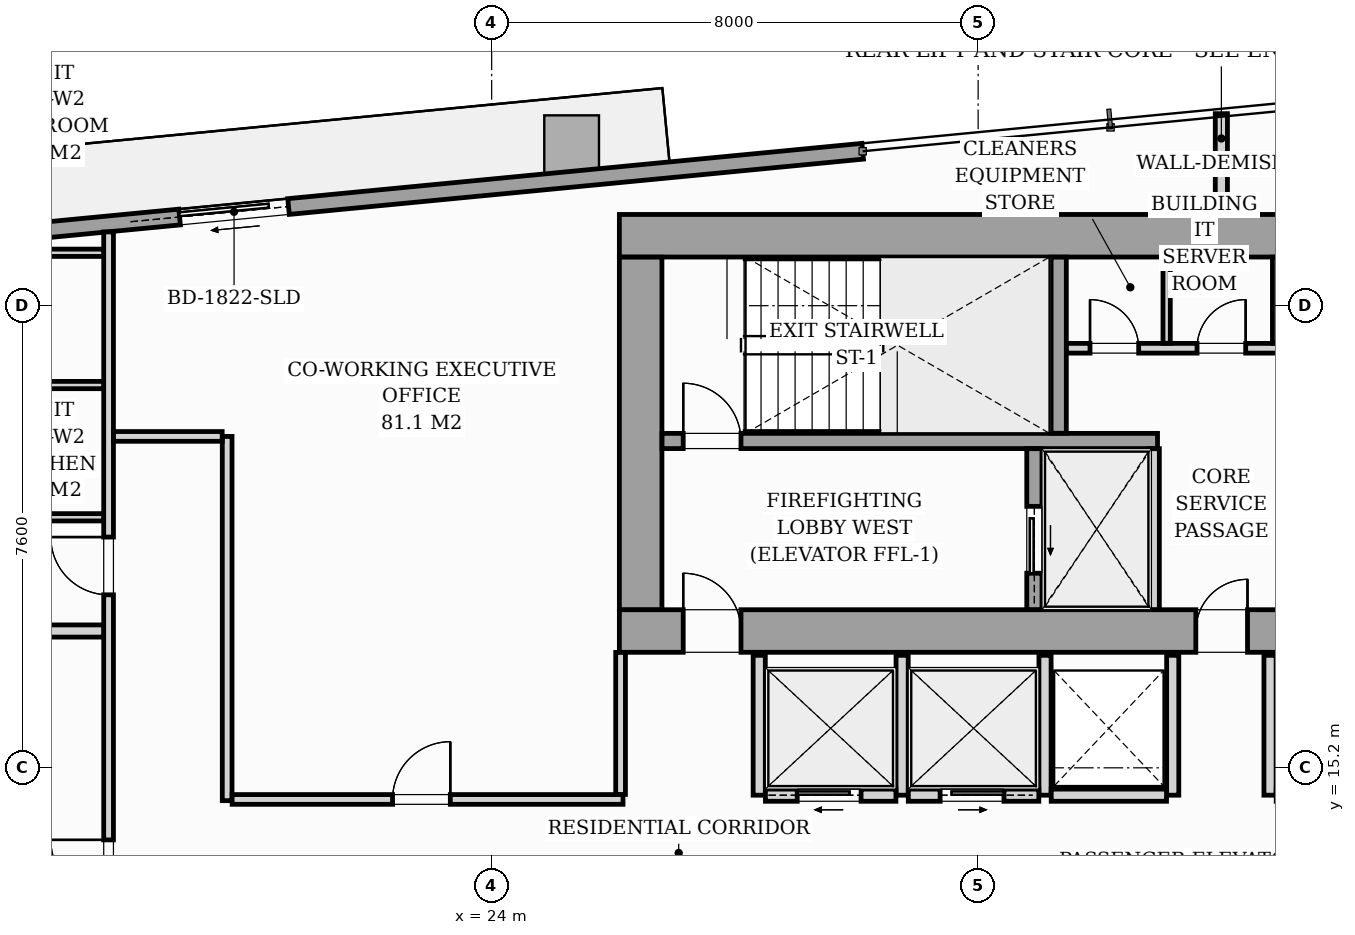
"""IFC4 building model, lengths in metres.
Left out: names, types, materials, properties, quantities, classifications, styles, units other than length and angle.
Written with IfcOpenShell. Run it as: python <this file> out.ifc"""

import sys

from ifc_helpers import new_model, si_unit, direction, frame, frame_2d, origin, origin_2d, place, context, subcontext, project, spatial, rectangle, i_section, extrude, source, transform, mapped, element, fill, save


model = new_model("IFC4")
c1 = context("Model", 3, precision=1e-05, world=origin(), true_north=direction((0.0, 1.0)))
c2 = subcontext(c1, "Body", "Model", "MODEL_VIEW")
j1 = project(units=[si_unit("LENGTHUNIT", "METRE"), si_unit("PLANEANGLEUNIT", "RADIAN")], contexts=[c1])
p1 = place(None, origin())
s1 = spatial("IfcSite", under=j1, at=p1, CompositionType="ELEMENT")
p2 = place(p1, origin())
s2 = spatial("IfcBuilding", under=s1, at=p2, CompositionType="ELEMENT")
p3 = place(p2, frame((0.0, 0.0, 84.2)))
s3 = spatial("IfcBuildingStorey", under=s2, at=p3, CompositionType="ELEMENT", Elevation=84.2)
m1 = source(origin(), c2, "Body", "SweptSolid", [
    extrude(i_section(OverallWidth=0.427, OverallDepth=0.483, WebThickness=0.051, FlangeThickness=0.082, FilletRadius=0.018, at=origin_2d()), origin(), (0.0, 0.0, 1.0), 3.196),
])
for number, where, z_axis, x_axis in (
    (1, (26.4, 17.4, 0.002), (0.0, 0.0, 1.0), (1.0, 0.0, 0.0)),
    (2, (33.12, 17.4, 0.002), (0.0, 0.0, 1.0), (1.0, 0.0, 0.0)),
    (3, (26.4, 24.0, 0.002), (0.0, 0.0, 1.0), (1.0, 0.0, 0.0)),
    (4, (33.12, 24.0, 0.002), (0.0, 0.0, 1.0), (1.0, 0.0, 0.0)),
):
    element("IfcColumn", number, at=place(p3, frame(where, z_axis=z_axis, x_axis=x_axis)), inside=s3, PredefinedType="PILASTER", context=c2, shape_type="MappedRepresentation", body=[
        mapped(m1, transform((0.0, 0.0, 0.0), scale=1.0)),
    ])
m2 = source(origin(), c2, "Body", "SweptSolid", [
    extrude(rectangle(XDim=0.9, YDim=1.1, at=origin_2d()), origin(), (0.0, 0.0, 1.0), 3.196),
])
p4 = place(p3, frame((25.315, 25.38, 0.002), z_axis=(0.0, 0.0, 1.0), x_axis=(0.995396198367, 0.09584575252, 0.0)))
e5 = element("IfcColumn", 5, at=p4, inside=s3, PredefinedType="COLUMN", context=c2, shape_type="MappedRepresentation", body=[
    mapped(m2, transform((0.0, 0.0, 0.0), scale=1.0)),
])
p5 = place(p3, frame((11.08, 23.508, 0.0), z_axis=(0.0, 0.0, 1.0), x_axis=(0.995396638587, 0.095841180552, 0.0)))
e6 = element("IfcWall", 6, at=p5, inside=s3, PredefinedType="STANDARD", context=c2, shape_type="SweptSolid", body=[
    extrude(rectangle(XDim=19.11, YDim=0.26, at=frame_2d((9.555, 0.0))), origin(), (0.0, 0.0, 1.0), 2.94),
])
p6 = place(p5, frame((7.824, 0.0, 0.0)))
e7 = element("IfcOpeningElement", 7, at=p6, cuts=e6, PredefinedType="OPENING", context=c2, shape_type="SweptSolid", body=[
    extrude(rectangle(XDim=1.8, YDim=2.06, at=frame_2d((0.9, 1.03))), frame((0.0, 0.14, 0.0), z_axis=(0.0, -1.0, 0.0), x_axis=(1.0, 0.0, 0.0)), (0.0, 0.0, 1.0), 0.28),
])
p7 = place(p5, frame((2.05, 0.0, 0.65)))
e8 = element("IfcOpeningElement", 8, at=p7, cuts=e6, PredefinedType="OPENING", context=c2, shape_type="SweptSolid", body=[
    extrude(rectangle(XDim=1.6, YDim=1.5, at=frame_2d((0.8, 0.75))), frame((0.0, 0.14, 0.0), z_axis=(0.0, -1.0, 0.0), x_axis=(1.0, 0.0, 0.0)), (0.0, 0.0, 1.0), 0.28),
])
p8 = place(p3, frame((26.1, 17.45, 0.0), z_axis=(0.0, 0.0, 1.0), x_axis=(1.0, 0.0, 0.0)))
e9 = element("IfcWall", 9, at=p8, inside=s3, PredefinedType="SHEAR", context=c2, shape_type="SweptSolid", body=[
    extrude(rectangle(XDim=19.8, YDim=0.7, at=frame_2d((9.9, 0.0))), origin(), (0.0, 0.0, 1.0), 3.2),
])
p9 = place(p8, frame((1.05, 0.0, 0.0)))
e10 = element("IfcOpeningElement", 10, at=p9, cuts=e9, PredefinedType="OPENING", context=c2, shape_type="SweptSolid", body=[
    extrude(rectangle(XDim=0.95, YDim=2.06, at=frame_2d((0.475, 1.03))), frame((0.0, 0.36, 0.0), z_axis=(0.0, -1.0, 0.0), x_axis=(1.0, 0.0, 0.0)), (0.0, 0.0, 1.0), 0.72),
])
p10 = place(p8, frame((9.48, 0.0, 0.0)))
e11 = element("IfcOpeningElement", 11, at=p10, cuts=e9, PredefinedType="OPENING", context=c2, shape_type="SweptSolid", body=[
    extrude(rectangle(XDim=0.85, YDim=2.0, at=frame_2d((0.425, 1.0))), frame((0.0, 0.36, 0.0), z_axis=(0.0, -1.0, 0.0), x_axis=(1.0, 0.0, 0.0)), (0.0, 0.0, 1.0), 0.72),
])
p11 = place(p8, frame((17.65, 0.0, 0.0)))
e12 = element("IfcOpeningElement", 12, at=p11, cuts=e9, PredefinedType="OPENING", context=c2, shape_type="SweptSolid", body=[
    extrude(rectangle(XDim=0.95, YDim=2.06, at=frame_2d((0.475, 1.03))), frame((0.0, 0.36, 0.0), z_axis=(0.0, -1.0, 0.0), x_axis=(1.0, 0.0, 0.0)), (0.0, 0.0, 1.0), 0.72),
])
p12 = place(p3, frame((26.1, 23.95, 0.0), z_axis=(0.0, 0.0, 1.0), x_axis=(1.0, 0.0, 0.0)))
e13 = element("IfcWall", 13, at=p12, inside=s3, PredefinedType="SHEAR", context=c2, shape_type="SweptSolid", body=[
    extrude(rectangle(XDim=19.8, YDim=0.7, at=frame_2d((9.9, 0.0))), origin(), (0.0, 0.0, 1.0), 3.2),
])
p13 = place(p3, frame((26.45, 17.802, 0.0), z_axis=(0.0, 0.0, 1.0), x_axis=(0.0, 1.0, 0.0)))
e14 = element("IfcWall", 14, at=p13, inside=s3, PredefinedType="SHEAR", context=c2, shape_type="SweptSolid", body=[
    extrude(rectangle(XDim=5.796, YDim=0.7, at=frame_2d((2.898, 0.0))), origin(), (0.0, 0.0, 1.0), 3.2),
])
p14 = place(p3, frame((26.802, 20.575, 0.0), z_axis=(0.0, 0.0, 1.0), x_axis=(1.0, 0.0, 0.0)))
e15 = element("IfcWall", 15, at=p14, inside=s3, PredefinedType="SOLIDWALL", context=c2, shape_type="SweptSolid", body=[
    extrude(rectangle(XDim=8.148, YDim=0.25, at=frame_2d((4.074, 0.0))), origin(), (0.0, 0.0, 1.0), 3.2),
])
p15 = place(p14, frame((0.348, 0.0, 0.0)))
e16 = element("IfcOpeningElement", 16, at=p15, cuts=e15, PredefinedType="OPENING", context=c2, shape_type="SweptSolid", body=[
    extrude(rectangle(XDim=0.95, YDim=2.06, at=frame_2d((0.475, 1.03))), frame((0.0, 0.135, 0.0), z_axis=(0.0, -1.0, 0.0), x_axis=(1.0, 0.0, 0.0)), (0.0, 0.0, 1.0), 0.27),
])
p16 = place(p3, frame((33.325, 20.702, 0.0), z_axis=(0.0, 0.0, 1.0), x_axis=(0.0, 1.0, 0.0)))
e17 = element("IfcWall", 17, at=p16, inside=s3, PredefinedType="SOLIDWALL", context=c2, shape_type="SweptSolid", body=[
    extrude(rectangle(XDim=2.896, YDim=0.25, at=frame_2d((1.448, 0.0))), origin(), (0.0, 0.0, 1.0), 3.2),
])
p17 = place(p3, frame((32.925, 17.802, 0.0), z_axis=(0.0, 0.0, 1.0), x_axis=(0.0, 1.0, 0.0)))
e18 = element("IfcWall", 18, at=p17, inside=s3, PredefinedType="SOLIDWALL", context=c2, shape_type="SweptSolid", body=[
    extrude(rectangle(XDim=2.646, YDim=0.25, at=frame_2d((1.323, 0.0))), origin(), (0.0, 0.0, 1.0), 3.2),
])
p18 = place(p17, frame((0.598, 0.0, 0.0)))
e19 = element("IfcOpeningElement", 19, at=p18, cuts=e18, PredefinedType="OPENING", context=c2, shape_type="SweptSolid", body=[
    extrude(rectangle(XDim=1.1, YDim=2.08, at=frame_2d((0.55, 1.04))), frame((0.0, 0.135, 0.0), z_axis=(0.0, -1.0, 0.0), x_axis=(1.0, 0.0, 0.0)), (0.0, 0.0, 1.0), 0.27),
])
p19 = place(p3, frame((34.9, 17.802, 0.0), z_axis=(0.0, 0.0, 1.0), x_axis=(0.0, 1.0, 0.0)))
e20 = element("IfcWall", 20, at=p19, inside=s3, PredefinedType="PARTITIONING", context=c2, shape_type="SweptSolid", body=[
    extrude(rectangle(XDim=2.646, YDim=0.16, at=frame_2d((1.323, 0.0))), origin(), (0.0, 0.0, 1.0), 2.94),
])
p20 = place(p3, frame((33.452, 22.1, 0.0), z_axis=(0.0, 0.0, 1.0), x_axis=(1.0, 0.0, 0.0)))
e21 = element("IfcWall", 21, at=p20, inside=s3, PredefinedType="PARTITIONING", context=c2, shape_type="SweptSolid", body=[
    extrude(rectangle(XDim=5.096, YDim=0.16, at=frame_2d((2.548, 0.0))), origin(), (0.0, 0.0, 1.0), 2.94),
])
p21 = place(p20, frame((0.388, 0.0, 0.0)))
e22 = element("IfcOpeningElement", 22, at=p21, cuts=e21, PredefinedType="OPENING", context=c2, shape_type="SweptSolid", body=[
    extrude(rectangle(XDim=0.8, YDim=2.05, at=frame_2d((0.4, 1.025))), frame((0.0, 0.09, 0.0), z_axis=(0.0, -1.0, 0.0), x_axis=(1.0, 0.0, 0.0)), (0.0, 0.0, 1.0), 0.18),
])
p22 = place(p20, frame((2.148, 0.0, 0.0)))
e23 = element("IfcOpeningElement", 23, at=p22, cuts=e21, PredefinedType="OPENING", context=c2, shape_type="SweptSolid", body=[
    extrude(rectangle(XDim=0.8, YDim=2.05, at=frame_2d((0.4, 1.025))), frame((0.0, 0.09, 0.0), z_axis=(0.0, -1.0, 0.0), x_axis=(1.0, 0.0, 0.0)), (0.0, 0.0, 1.0), 0.18),
])
p23 = place(p20, frame((3.908, 0.0, 0.0)))
e24 = element("IfcOpeningElement", 24, at=p23, cuts=e21, PredefinedType="OPENING", context=c2, shape_type="SweptSolid", body=[
    extrude(rectangle(XDim=0.8, YDim=2.05, at=frame_2d((0.4, 1.025))), frame((0.0, 0.09, 0.0), z_axis=(0.0, -1.0, 0.0), x_axis=(1.0, 0.0, 0.0)), (0.0, 0.0, 1.0), 0.18),
])
for number, where, z_axis, x_axis in (
    (25, (35.1, 22.182, 0.0), (0.0, 0.0, 1.0), (0.0, 1.0, 0.0)),
    (26, (36.9, 22.182, 0.0), (0.0, 0.0, 1.0), (0.0, 1.0, 0.0)),
):
    element("IfcWall", number, at=place(p3, frame(where, z_axis=z_axis, x_axis=x_axis)), inside=s3, PredefinedType="PARTITIONING", context=c2, shape_type="SweptSolid", body=[
        extrude(rectangle(XDim=1.416, YDim=0.12, at=frame_2d((0.708, 0.0))), origin(), (0.0, 0.0, 1.0), 2.94),
    ])
for number, where, z_axis, x_axis in (
    (27, (28.4, 14.75, 0.0), (0.0, 0.0, 1.0), (0.0, 1.0, 0.0)),
    (28, (30.75, 14.75, 0.0), (0.0, 0.0, 1.0), (0.0, 1.0, 0.0)),
    (29, (33.1, 14.75, 0.0), (0.0, 0.0, 1.0), (0.0, 1.0, 0.0)),
):
    element("IfcWall", number, at=place(p3, frame(where, z_axis=z_axis, x_axis=x_axis)), inside=s3, PredefinedType="PARTITIONING", context=c2, shape_type="SweptSolid", body=[
        extrude(rectangle(XDim=2.3, YDim=0.2, at=frame_2d((1.15, 0.0))), origin(), (0.0, 0.0, 1.0), 2.94),
    ])
p24 = place(p3, frame((28.502, 14.75, 0.0), z_axis=(0.0, 0.0, 1.0), x_axis=(1.0, 0.0, 0.0)))
e30 = element("IfcWall", 30, at=p24, inside=s3, PredefinedType="PARTITIONING", context=c2, shape_type="SweptSolid", body=[
    extrude(rectangle(XDim=2.146, YDim=0.2, at=frame_2d((1.073, 0.0))), origin(), (0.0, 0.0, 1.0), 2.94),
])
p25 = place(p24, frame((0.523, 0.0, 0.0)))
e31 = element("IfcOpeningElement", 31, at=p25, cuts=e30, PredefinedType="OPENING", context=c2, shape_type="SweptSolid", body=[
    extrude(rectangle(XDim=1.05, YDim=2.08, at=frame_2d((0.525, 1.04))), frame((0.0, 0.11, 0.0), z_axis=(0.0, -1.0, 0.0), x_axis=(1.0, 0.0, 0.0)), (0.0, 0.0, 1.0), 0.22),
])
p26 = place(p3, frame((30.852, 14.75, 0.0), z_axis=(0.0, 0.0, 1.0), x_axis=(1.0, 0.0, 0.0)))
e32 = element("IfcWall", 32, at=p26, inside=s3, PredefinedType="PARTITIONING", context=c2, shape_type="SweptSolid", body=[
    extrude(rectangle(XDim=2.146, YDim=0.2, at=frame_2d((1.073, 0.0))), origin(), (0.0, 0.0, 1.0), 2.94),
])
p27 = place(p26, frame((0.523, 0.0, 0.0)))
e33 = element("IfcOpeningElement", 33, at=p27, cuts=e32, PredefinedType="OPENING", context=c2, shape_type="SweptSolid", body=[
    extrude(rectangle(XDim=1.05, YDim=2.08, at=frame_2d((0.525, 1.04))), frame((0.0, 0.11, 0.0), z_axis=(0.0, -1.0, 0.0), x_axis=(1.0, 0.0, 0.0)), (0.0, 0.0, 1.0), 0.22),
])
p28 = place(p3, frame((35.2, 14.75, 0.0), z_axis=(0.0, 0.0, 1.0), x_axis=(0.0, 1.0, 0.0)))
e34 = element("IfcWall", 34, at=p28, inside=s3, PredefinedType="PARTITIONING", context=c2, shape_type="SweptSolid", body=[
    extrude(rectangle(XDim=2.3, YDim=0.2, at=frame_2d((1.15, 0.0))), origin(), (0.0, 0.0, 1.0), 2.94),
])
p29 = place(p3, frame((33.202, 14.75, 0.0), z_axis=(0.0, 0.0, 1.0), x_axis=(1.0, 0.0, 0.0)))
e35 = element("IfcWall", 35, at=p29, inside=s3, PredefinedType="PARTITIONING", context=c2, shape_type="SweptSolid", body=[
    extrude(rectangle(XDim=1.896, YDim=0.2, at=frame_2d((0.948, 0.0))), origin(), (0.0, 0.0, 1.0), 2.94),
])
p30 = place(p3, frame((36.8, 14.75, 0.0), z_axis=(0.0, 0.0, 1.0), x_axis=(0.0, 1.0, 0.0)))
e36 = element("IfcWall", 36, at=p30, inside=s3, PredefinedType="PARTITIONING", context=c2, shape_type="SweptSolid", body=[
    extrude(rectangle(XDim=2.3, YDim=0.2, at=frame_2d((1.15, 0.0))), origin(), (0.0, 0.0, 1.0), 2.94),
])
p31 = place(p3, frame((17.7, 12.572, 0.0), z_axis=(0.0, 0.0, 1.0), x_axis=(0.0, 1.0, 0.0)))
e37 = element("IfcWall", 37, at=p31, inside=s3, PredefinedType="PARTITIONING", context=c2, shape_type="SweptSolid", body=[
    extrude(rectangle(XDim=11.441, YDim=0.16, at=frame_2d((5.72, 0.0))), origin(), (0.0, 0.0, 1.0), 2.94),
])
p32 = place(p31, frame((0.493, 0.0, 0.0)))
e38 = element("IfcOpeningElement", 38, at=p32, cuts=e37, PredefinedType="OPENING", context=c2, shape_type="SweptSolid", body=[
    extrude(rectangle(XDim=0.95, YDim=2.06, at=frame_2d((0.475, 1.03))), frame((0.0, 0.09, 0.0), z_axis=(0.0, -1.0, 0.0), x_axis=(1.0, 0.0, 0.0)), (0.0, 0.0, 1.0), 0.18),
])
p33 = place(p31, frame((5.473, 0.0, 0.0)))
e39 = element("IfcOpeningElement", 39, at=p33, cuts=e37, PredefinedType="OPENING", context=c2, shape_type="SweptSolid", body=[
    extrude(rectangle(XDim=0.95, YDim=2.06, at=frame_2d((0.475, 1.03))), frame((0.0, 0.09, 0.0), z_axis=(0.0, -1.0, 0.0), x_axis=(1.0, 0.0, 0.0)), (0.0, 0.0, 1.0), 0.18),
])
p34 = place(p3, frame((36.0, 24.302, 0.0), z_axis=(0.0, 0.0, 1.0), x_axis=(0.0, 1.0, 0.0)))
e40 = element("IfcWall", 40, at=p34, inside=s3, PredefinedType="PARTITIONING", context=c2, shape_type="SweptSolid", body=[
    extrude(rectangle(XDim=1.656, YDim=0.2, at=frame_2d((0.828, 0.0))), origin(), (0.0, 0.0, 1.0), 2.94),
])
p35 = place(p3, frame((9.232, 17.45, 0.0), z_axis=(0.0, 0.0, 1.0), x_axis=(1.0, 0.0, 0.0)))
e41 = element("IfcWall", 41, at=p35, inside=s3, PredefinedType="PARTITIONING", context=c2, shape_type="SweptSolid", body=[
    extrude(rectangle(XDim=8.386, YDim=0.2, at=frame_2d((4.193, 0.0))), origin(), (0.0, 0.0, 1.0), 2.94),
])
for number, where, z_axis, x_axis in (
    (42, (15.362, 21.495, 0.0), (0.0, 0.0, 1.0), (1.0, 0.0, 0.0)),
    (43, (15.362, 19.32, 0.0), (0.0, 0.0, 1.0), (1.0, 0.0, 0.0)),
):
    element("IfcWall", number, at=place(p3, frame(where, z_axis=z_axis, x_axis=x_axis)), inside=s3, PredefinedType="PARTITIONING", context=c2, shape_type="SweptSolid", body=[
        extrude(rectangle(XDim=2.256, YDim=0.12, at=frame_2d((1.128, 0.0))), origin(), (0.0, 0.0, 1.0), 2.94),
    ])
p36 = place(p3, frame((15.362, 23.67, 0.0), z_axis=(0.0, 0.0, 1.0), x_axis=(1.0, 0.0, 0.0)))
e44 = element("IfcWall", 44, at=p36, inside=s3, PredefinedType="PARTITIONING", context=c2, shape_type="SweptSolid", body=[
    extrude(rectangle(XDim=2.256, YDim=0.12, at=frame_2d((1.128, 0.0))), origin(), (0.0, 0.0, 1.0), 2.31),
])
p37 = place(p3, frame((19.65, 14.66, 0.0), z_axis=(0.0, 0.0, 1.0), x_axis=(0.0, 1.0, 0.0)))
e45 = element("IfcWall", 45, at=p37, inside=s3, PredefinedType="PARTITIONING", context=c2, shape_type="SweptSolid", body=[
    extrude(rectangle(XDim=5.99, YDim=0.16, at=frame_2d((2.995, 0.0))), origin(), (0.0, 0.0, 1.0), 2.94),
])
p38 = place(p3, frame((17.782, 20.65, 0.0), z_axis=(0.0, 0.0, 1.0), x_axis=(1.0, 0.0, 0.0)))
e46 = element("IfcWall", 46, at=p38, inside=s3, PredefinedType="PARTITIONING", context=c2, shape_type="SweptSolid", body=[
    extrude(rectangle(XDim=1.786, YDim=0.16, at=frame_2d((0.893, 0.0))), origin(), (0.0, 0.0, 1.0), 2.94),
])
p39 = place(p3, frame((19.732, 14.68, 0.0), z_axis=(0.0, 0.0, 1.0), x_axis=(1.0, 0.0, 0.0)))
e47 = element("IfcWall", 47, at=p39, inside=s3, PredefinedType="PARTITIONING", context=c2, shape_type="SweptSolid", body=[
    extrude(rectangle(XDim=6.428, YDim=0.16, at=frame_2d((3.214, 0.0))), origin(), (0.0, 0.0, 1.0), 2.94),
])
p40 = place(p39, frame((2.638, 0.0, 0.0)))
e48 = element("IfcOpeningElement", 48, at=p40, cuts=e47, PredefinedType="OPENING", context=c2, shape_type="SweptSolid", body=[
    extrude(rectangle(XDim=0.95, YDim=2.06, at=frame_2d((0.475, 1.03))), frame((0.0, 0.09, 0.0), z_axis=(0.0, -1.0, 0.0), x_axis=(1.0, 0.0, 0.0)), (0.0, 0.0, 1.0), 0.18),
])
p41 = place(p3, frame((26.12, 14.762, 0.0), z_axis=(0.0, 0.0, 1.0), x_axis=(0.0, 1.0, 0.0)))
e49 = element("IfcWall", 49, at=p41, inside=s3, PredefinedType="PARTITIONING", context=c2, shape_type="SweptSolid", body=[
    extrude(rectangle(XDim=2.336, YDim=0.16, at=frame_2d((1.168, 0.0))), origin(), (0.0, 0.0, 1.0), 2.94),
])
m3 = source(origin(), c2, "Body", "SweptSolid", [
    extrude(rectangle(XDim=1.8, YDim=2.06, at=frame_2d((0.9, 1.03))), frame((0.0, 0.025, 0.0), z_axis=(0.0, -1.0, 0.0), x_axis=(1.0, 0.0, 0.0)), (0.0, 0.0, 1.0), 0.05),
])
p42 = place(p6, origin())
e50 = element("IfcDoor", 50, at=p42, inside=s3, OperationType="SLIDING_TO_LEFT", PredefinedType="DOOR", context=c2, shape_type="MappedRepresentation", body=[
    mapped(m3, transform((0.0, 0.0, 0.0), scale=1.0)),
])
fill(e7, e50)
m4 = source(origin(), c2, "Body", "SweptSolid", [
    extrude(rectangle(XDim=0.95, YDim=2.06, at=frame_2d((0.475, 1.03))), frame((0.0, 0.025, 0.0), z_axis=(0.0, -1.0, 0.0), x_axis=(1.0, 0.0, 0.0)), (0.0, 0.0, 1.0), 0.05),
])
p43 = place(p9, origin())
e51 = element("IfcDoor", 51, at=p43, inside=s3, OperationType="SINGLE_SWING_LEFT", PredefinedType="DOOR", context=c2, shape_type="MappedRepresentation", body=[
    mapped(m4, transform((0.0, 0.0, 0.0), scale=1.0)),
])
fill(e10, e51)
m5 = source(origin(), c2, "Body", "SweptSolid", [
    extrude(rectangle(XDim=0.85, YDim=2.0, at=frame_2d((0.425, 1.0))), frame((0.0, 0.025, 0.0), z_axis=(0.0, -1.0, 0.0), x_axis=(1.0, 0.0, 0.0)), (0.0, 0.0, 1.0), 0.05),
])
p44 = place(p10, origin())
e52 = element("IfcDoor", 52, at=p44, inside=s3, OperationType="SINGLE_SWING_RIGHT", PredefinedType="DOOR", context=c2, shape_type="MappedRepresentation", body=[
    mapped(m5, transform((0.0, 0.0, 0.0), scale=1.0)),
])
fill(e11, e52)
p45 = place(p15, origin())
e53 = element("IfcDoor", 53, at=p45, inside=s3, OperationType="SINGLE_SWING_LEFT", PredefinedType="DOOR", context=c2, shape_type="MappedRepresentation", body=[
    mapped(m4, transform((0.0, 0.0, 0.0), scale=1.0)),
])
fill(e16, e53)
m6 = source(origin(), c2, "Body", "SweptSolid", [
    extrude(rectangle(XDim=1.1, YDim=2.08, at=frame_2d((0.55, 1.04))), frame((0.0, 0.025, 0.0), z_axis=(0.0, -1.0, 0.0), x_axis=(1.0, 0.0, 0.0)), (0.0, 0.0, 1.0), 0.05),
])
p46 = place(p18, origin())
e54 = element("IfcDoor", 54, at=p46, inside=s3, OperationType="SLIDING_TO_LEFT", PredefinedType="DOOR", context=c2, shape_type="MappedRepresentation", body=[
    mapped(m6, transform((0.0, 0.0, 0.0), scale=1.0)),
])
fill(e19, e54)
m7 = source(origin(), c2, "Body", "SweptSolid", [
    extrude(rectangle(XDim=0.8, YDim=2.05, at=frame_2d((0.4, 1.025))), frame((0.0, 0.025, 0.0), z_axis=(0.0, -1.0, 0.0), x_axis=(1.0, 0.0, 0.0)), (0.0, 0.0, 1.0), 0.05),
])
p47 = place(p21, origin())
e55 = element("IfcDoor", 55, at=p47, inside=s3, OperationType="SINGLE_SWING_LEFT", PredefinedType="DOOR", context=c2, shape_type="MappedRepresentation", body=[
    mapped(m7, transform((0.0, 0.0, 0.0), scale=1.0)),
])
fill(e22, e55)
p48 = place(p22, origin())
e56 = element("IfcDoor", 56, at=p48, inside=s3, OperationType="SINGLE_SWING_RIGHT", PredefinedType="DOOR", context=c2, shape_type="MappedRepresentation", body=[
    mapped(m7, transform((0.0, 0.0, 0.0), scale=1.0)),
])
fill(e23, e56)
m8 = source(origin(), c2, "Body", "SweptSolid", [
    extrude(rectangle(XDim=1.05, YDim=2.08, at=frame_2d((0.525, 1.04))), frame((0.0, 0.025, 0.0), z_axis=(0.0, -1.0, 0.0), x_axis=(1.0, 0.0, 0.0)), (0.0, 0.0, 1.0), 0.05),
])
p49 = place(p25, origin())
e57 = element("IfcDoor", 57, at=p49, inside=s3, OperationType="SLIDING_TO_LEFT", PredefinedType="DOOR", context=c2, shape_type="MappedRepresentation", body=[
    mapped(m8, transform((0.0, 0.0, 0.0), scale=1.0)),
])
fill(e31, e57)
p50 = place(p27, origin())
e58 = element("IfcDoor", 58, at=p50, inside=s3, OperationType="SLIDING_TO_RIGHT", PredefinedType="DOOR", context=c2, shape_type="MappedRepresentation", body=[
    mapped(m8, transform((0.0, 0.0, 0.0), scale=1.0)),
])
fill(e33, e58)
m9 = source(origin(), c2, "Body", "SweptSolid", [
    extrude(rectangle(XDim=0.95, YDim=2.06, at=frame_2d((0.475, 1.03))), frame((0.0, 0.025, 0.0), z_axis=(0.0, -1.0, 0.0), x_axis=(1.0, 0.0, 0.0)), (0.0, 0.0, 1.0), 0.05),
])
p51 = place(p32, origin())
e59 = element("IfcDoor", 59, at=p51, inside=s3, OperationType="SINGLE_SWING_RIGHT", PredefinedType="DOOR", context=c2, shape_type="MappedRepresentation", body=[
    mapped(m9, transform((0.0, 0.0, 0.0), scale=1.0)),
])
fill(e38, e59)
p52 = place(p33, origin())
e60 = element("IfcDoor", 60, at=p52, inside=s3, OperationType="SINGLE_SWING_RIGHT", PredefinedType="DOOR", context=c2, shape_type="MappedRepresentation", body=[
    mapped(m9, transform((0.0, 0.0, 0.0), scale=1.0)),
])
fill(e39, e60)
p53 = place(p40, origin())
e61 = element("IfcDoor", 61, at=p53, inside=s3, OperationType="SINGLE_SWING_RIGHT", PredefinedType="DOOR", context=c2, shape_type="MappedRepresentation", body=[
    mapped(m9, transform((0.0, 0.0, 0.0), scale=1.0)),
])
fill(e48, e61)
save(model, sys.argv[1])
